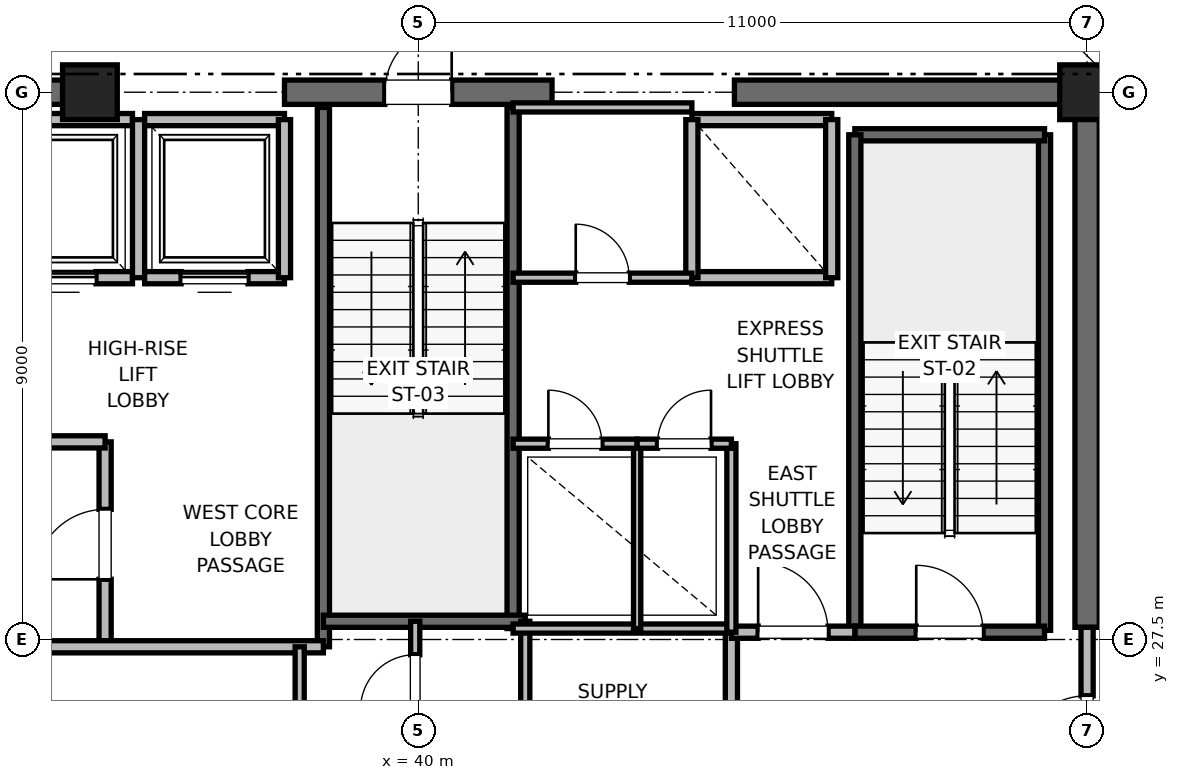
"""IFC4 building model, lengths in metres.
Left out: names, types, materials, properties, quantities, classifications, styles, units other than length and angle.
Written with IfcOpenShell. Run it as: python <this file> out.ifc"""

import sys

from ifc_helpers import new_model, si_unit, direction, frame, frame_2d, origin, origin_2d, place, context, subcontext, project, spatial, rectangle, extrude, element, fill, save


model = new_model("IFC4")
c1 = context("Model", 3, precision=1e-05, world=origin(), true_north=direction((0.0, 1.0)))
c2 = subcontext(c1, "Body", "Model", "MODEL_VIEW")
j1 = project(units=[si_unit("LENGTHUNIT", "METRE"), si_unit("PLANEANGLEUNIT", "RADIAN")], contexts=[c1])
p1 = place(None, origin())
s1 = spatial("IfcSite", under=j1, at=p1, CompositionType="ELEMENT")
p2 = place(p1, origin())
s2 = spatial("IfcBuilding", under=s1, at=p2, CompositionType="ELEMENT")
p3 = place(p2, frame((0.0, 0.0, 318.8)))
s3 = spatial("IfcBuildingStorey", under=s2, at=p3, CompositionType="ELEMENT", Elevation=318.8)
for number, where, z_axis, x_axis in (
    (1, (51.0, 36.5, 0.0), (0.0, 0.0, 1.0), (1.0, 0.0, 0.0)),
    (2, (34.6, 36.5, 0.0), (0.0, 0.0, 1.0), (1.0, 0.0, 0.0)),
):
    element("IfcColumn", number, at=place(p3, frame(where, z_axis=z_axis, x_axis=x_axis)), inside=s3, PredefinedType="PILASTER", context=c2, shape_type="SweptSolid", body=[
        extrude(rectangle(XDim=0.9, YDim=0.9, at=origin_2d()), origin(), (0.0, 0.0, 1.0), 4.0),
    ])
p4 = place(p3, frame((29.0, 36.5, 0.0), z_axis=(0.0, 0.0, 1.0), x_axis=(1.0, 0.0, 0.0)))
e3 = element("IfcWall", 3, at=p4, inside=s3, PredefinedType="SHEAR", context=c2, shape_type="SweptSolid", body=[
    extrude(rectangle(XDim=5.8, YDim=0.4, at=frame_2d((2.9, 0.0))), origin(), (0.0, 0.0, 1.0), 3.785),
])
p5 = place(p3, frame((37.8, 36.5, 0.0), z_axis=(0.0, 0.0, 1.0), x_axis=(1.0, 0.0, 0.0)))
e4 = element("IfcWall", 4, at=p5, inside=s3, PredefinedType="SHEAR", context=c2, shape_type="SweptSolid", body=[
    extrude(rectangle(XDim=4.4, YDim=0.4, at=frame_2d((2.2, 0.0))), origin(), (0.0, 0.0, 1.0), 3.785),
])
p6 = place(p5, frame((1.65, 0.0, 0.0)))
e5 = element("IfcOpeningElement", 5, at=p6, cuts=e4, PredefinedType="OPENING", context=c2, shape_type="SweptSolid", body=[
    extrude(rectangle(XDim=1.1, YDim=2.15, at=frame_2d((0.55, 1.075))), frame((0.0, 0.2, 0.0), z_axis=(0.0, -1.0, 0.0), x_axis=(1.0, 0.0, 0.0)), (0.0, 0.0, 1.0), 0.4),
])
p7 = place(p3, frame((45.2, 36.5, 0.0), z_axis=(0.0, 0.0, 1.0), x_axis=(1.0, 0.0, 0.0)))
e6 = element("IfcWall", 6, at=p7, inside=s3, PredefinedType="SHEAR", context=c2, shape_type="SweptSolid", body=[
    extrude(rectangle(XDim=5.8, YDim=0.4, at=frame_2d((2.9, 0.0))), origin(), (0.0, 0.0, 1.0), 3.785),
])
p8 = place(p3, frame((51.0, 27.7, 0.0), z_axis=(0.0, 0.0, 1.0), x_axis=(0.0, 1.0, 0.0)))
e7 = element("IfcWall", 7, at=p8, inside=s3, PredefinedType="SHEAR", context=c2, shape_type="SweptSolid", body=[
    extrude(rectangle(XDim=8.8, YDim=0.4, at=frame_2d((4.4, 0.0))), origin(), (0.0, 0.0, 1.0), 3.785),
])
p9 = place(p3, frame((50.3, 27.65, 0.0), z_axis=(0.0, 0.0, 1.0), x_axis=(0.0, 1.0, 0.0)))
e8 = element("IfcWall", 8, at=p9, inside=s3, PredefinedType="SOLIDWALL", context=c2, shape_type="SweptSolid", body=[
    extrude(rectangle(XDim=8.15, YDim=0.2, at=frame_2d((4.075, 0.0))), origin(), (0.0, 0.0, 1.0), 3.785),
])
p10 = place(p3, frame((47.18, 35.8, 0.0), z_axis=(0.0, 0.0, 1.0), x_axis=(1.0, 0.0, 0.0)))
e9 = element("IfcWall", 9, at=p10, inside=s3, PredefinedType="SOLIDWALL", context=c2, shape_type="SweptSolid", body=[
    extrude(rectangle(XDim=3.12, YDim=0.2, at=frame_2d((1.56, 0.0))), origin(), (0.0, 0.0, 1.0), 3.785),
])
p11 = place(p3, frame((47.18, 27.62, 0.0), z_axis=(0.0, 0.0, 1.0), x_axis=(0.0, 1.0, 0.0)))
e10 = element("IfcWall", 10, at=p11, inside=s3, PredefinedType="SOLIDWALL", context=c2, shape_type="SweptSolid", body=[
    extrude(rectangle(XDim=8.18, YDim=0.2, at=frame_2d((4.09, 0.0))), origin(), (0.0, 0.0, 1.0), 3.785),
])
p12 = place(p3, frame((47.18, 27.62, 0.0), z_axis=(0.0, 0.0, 1.0), x_axis=(1.0, 0.0, 0.0)))
e11 = element("IfcWall", 11, at=p12, inside=s3, PredefinedType="SOLIDWALL", context=c2, shape_type="SweptSolid", body=[
    extrude(rectangle(XDim=3.12, YDim=0.2, at=frame_2d((1.56, 0.0))), origin(), (0.0, 0.0, 1.0), 3.785),
])
p13 = place(p12, frame((1.01, 0.0, 0.0)))
e12 = element("IfcOpeningElement", 12, at=p13, cuts=e11, PredefinedType="OPENING", context=c2, shape_type="SweptSolid", body=[
    extrude(rectangle(XDim=1.1, YDim=2.15, at=frame_2d((0.55, 1.075))), frame((0.0, 0.1, 0.0), z_axis=(0.0, -1.0, 0.0), x_axis=(1.0, 0.0, 0.0)), (0.0, 0.0, 1.0), 0.2),
])
p14 = place(p3, frame((38.44, 27.38, 0.0), z_axis=(0.0, 0.0, 1.0), x_axis=(0.0, 1.0, 0.0)))
e13 = element("IfcWall", 13, at=p14, inside=s3, PredefinedType="SOLIDWALL", context=c2, shape_type="SweptSolid", body=[
    extrude(rectangle(XDim=8.87, YDim=0.2, at=frame_2d((4.435, 0.0))), origin(), (0.0, 0.0, 1.0), 3.785),
])
p15 = place(p3, frame((41.56, 27.68, 0.0), z_axis=(0.0, 0.0, 1.0), x_axis=(0.0, 1.0, 0.0)))
e14 = element("IfcWall", 14, at=p15, inside=s3, PredefinedType="SOLIDWALL", context=c2, shape_type="SweptSolid", body=[
    extrude(rectangle(XDim=8.57, YDim=0.2, at=frame_2d((4.285, 0.0))), origin(), (0.0, 0.0, 1.0), 3.785),
])
p16 = place(p3, frame((38.44, 27.8, 0.0), z_axis=(0.0, 0.0, 1.0), x_axis=(1.0, 0.0, 0.0)))
e15 = element("IfcWall", 15, at=p16, inside=s3, PredefinedType="SOLIDWALL", context=c2, shape_type="SweptSolid", body=[
    extrude(rectangle(XDim=3.32, YDim=0.2, at=frame_2d((1.66, 0.0))), origin(), (0.0, 0.0, 1.0), 3.785),
])
p17 = place(p3, frame((34.85, 27.38, 0.0), z_axis=(0.0, 0.0, 1.0), x_axis=(0.0, 1.0, 0.0)))
e16 = element("IfcWall", 16, at=p17, inside=s3, PredefinedType="PARTITIONING", context=c2, shape_type="SweptSolid", body=[
    extrude(rectangle(XDim=3.37, YDim=0.2, at=frame_2d((1.685, 0.0))), origin(), (0.0, 0.0, 1.0), 3.785),
])
p18 = place(p17, frame((1.11, 0.0, 0.0)))
e17 = element("IfcOpeningElement", 17, at=p18, cuts=e16, PredefinedType="OPENING", context=c2, shape_type="SweptSolid", body=[
    extrude(rectangle(XDim=1.15, YDim=2.2, at=frame_2d((0.575, 1.1))), frame((0.0, 0.1, 0.0), z_axis=(0.0, -1.0, 0.0), x_axis=(1.0, 0.0, 0.0)), (0.0, 0.0, 1.0), 0.2),
])
p19 = place(p3, frame((32.82, 27.38, 0.0), z_axis=(0.0, 0.0, 1.0), x_axis=(1.0, 0.0, 0.0)))
e18 = element("IfcWall", 18, at=p19, inside=s3, PredefinedType="PARTITIONING", context=c2, shape_type="SweptSolid", body=[
    extrude(rectangle(XDim=5.62, YDim=0.2, at=frame_2d((2.81, 0.0))), origin(), (0.0, 0.0, 1.0), 3.785),
])
p20 = place(p3, frame((32.15, 30.75, 0.0), z_axis=(0.0, 0.0, 1.0), x_axis=(1.0, 0.0, 0.0)))
e19 = element("IfcWall", 19, at=p20, inside=s3, PredefinedType="PARTITIONING", context=c2, shape_type="SweptSolid", body=[
    extrude(rectangle(XDim=2.7, YDim=0.2, at=frame_2d((1.35, 0.0))), origin(), (0.0, 0.0, 1.0), 3.785),
])
p21 = place(p3, frame((45.15, 24.25, 0.0), z_axis=(0.0, 0.0, 1.0), x_axis=(0.0, 1.0, 0.0)))
e20 = element("IfcWall", 20, at=p21, inside=s3, PredefinedType="PARTITIONING", context=c2, shape_type="SweptSolid", body=[
    extrude(rectangle(XDim=3.37, YDim=0.2, at=frame_2d((1.685, 0.0))), origin(), (0.0, 0.0, 1.0), 3.785),
])
p22 = place(p3, frame((45.15, 27.62, 0.0), z_axis=(0.0, 0.0, 1.0), x_axis=(1.0, 0.0, 0.0)))
e21 = element("IfcWall", 21, at=p22, inside=s3, PredefinedType="PARTITIONING", context=c2, shape_type="SweptSolid", body=[
    extrude(rectangle(XDim=2.03, YDim=0.2, at=frame_2d((1.015, 0.0))), origin(), (0.0, 0.0, 1.0), 3.785),
])
p23 = place(p22, frame((0.44, 0.0, 0.0)))
e22 = element("IfcOpeningElement", 22, at=p23, cuts=e21, PredefinedType="OPENING", context=c2, shape_type="SweptSolid", body=[
    extrude(rectangle(XDim=1.15, YDim=2.2, at=frame_2d((0.575, 1.1))), frame((0.0, 0.1, 0.0), z_axis=(0.0, -1.0, 0.0), x_axis=(1.0, 0.0, 0.0)), (0.0, 0.0, 1.0), 0.2),
])
p24 = place(p3, frame((51.0, 24.3, 0.0), z_axis=(0.0, 0.0, 1.0), x_axis=(0.0, 1.0, 0.0)))
e23 = element("IfcWall", 23, at=p24, inside=s3, PredefinedType="PARTITIONING", context=c2, shape_type="SweptSolid", body=[
    extrude(rectangle(XDim=3.4, YDim=0.2, at=frame_2d((1.7, 0.0))), origin(), (0.0, 0.0, 1.0), 2.865),
])
p25 = place(p24, frame((1.125, 0.0, 0.0)))
e24 = element("IfcOpeningElement", 24, at=p25, cuts=e23, PredefinedType="OPENING", context=c2, shape_type="SweptSolid", body=[
    extrude(rectangle(XDim=1.15, YDim=2.2, at=frame_2d((0.575, 1.1))), frame((0.0, 0.1, 0.0), z_axis=(0.0, -1.0, 0.0), x_axis=(1.0, 0.0, 0.0)), (0.0, 0.0, 1.0), 0.2),
])
p26 = place(p3, frame((33.0, 33.45, 0.0), z_axis=(0.0, 0.0, 1.0), x_axis=(1.0, 0.0, 0.0)))
e25 = element("IfcWall", 25, at=p26, inside=s3, PredefinedType="SOLIDWALL", context=c2, shape_type="SweptSolid", body=[
    extrude(rectangle(XDim=2.3, YDim=0.2, at=frame_2d((1.15, 0.0))), origin(), (0.0, 0.0, 1.0), 3.785),
])
p27 = place(p26, frame((0.6, 0.0, 0.0)))
e26 = element("IfcOpeningElement", 26, at=p27, cuts=e25, PredefinedType="OPENING", context=c2, shape_type="SweptSolid", body=[
    extrude(rectangle(XDim=1.1, YDim=2.2, at=frame_2d((0.55, 1.1))), frame((0.0, 0.1, 0.0), z_axis=(0.0, -1.0, 0.0), x_axis=(1.0, 0.0, 0.0)), (0.0, 0.0, 1.0), 0.2),
])
p28 = place(p3, frame((35.3, 36.05, 0.0), z_axis=(0.0, 0.0, 1.0), x_axis=(-1.0, 0.0, 0.0)))
e27 = element("IfcWall", 27, at=p28, inside=s3, PredefinedType="SOLIDWALL", context=c2, shape_type="SweptSolid", body=[
    extrude(rectangle(XDim=2.3, YDim=0.2, at=frame_2d((1.15, 0.0))), origin(), (0.0, 0.0, 1.0), 2.865),
])
p29 = place(p3, frame((35.4, 33.45, 0.0), z_axis=(0.0, 0.0, 1.0), x_axis=(0.0, 1.0, 0.0)))
e28 = element("IfcWall", 28, at=p29, inside=s3, PredefinedType="SOLIDWALL", context=c2, shape_type="SweptSolid", body=[
    extrude(rectangle(XDim=2.6, YDim=0.2, at=frame_2d((1.3, 0.0))), origin(), (0.0, 0.0, 1.0), 2.865),
])
p30 = place(p3, frame((35.5, 33.45, 0.0), z_axis=(0.0, 0.0, 1.0), x_axis=(1.0, 0.0, 0.0)))
e29 = element("IfcWall", 29, at=p30, inside=s3, PredefinedType="SOLIDWALL", context=c2, shape_type="SweptSolid", body=[
    extrude(rectangle(XDim=2.3, YDim=0.2, at=frame_2d((1.15, 0.0))), origin(), (0.0, 0.0, 1.0), 3.785),
])
p31 = place(p30, frame((0.6, 0.0, 0.0)))
e30 = element("IfcOpeningElement", 30, at=p31, cuts=e29, PredefinedType="OPENING", context=c2, shape_type="SweptSolid", body=[
    extrude(rectangle(XDim=1.1, YDim=2.2, at=frame_2d((0.55, 1.1))), frame((0.0, 0.1, 0.0), z_axis=(0.0, -1.0, 0.0), x_axis=(1.0, 0.0, 0.0)), (0.0, 0.0, 1.0), 0.2),
])
p32 = place(p3, frame((37.8, 36.05, 0.0), z_axis=(0.0, 0.0, 1.0), x_axis=(-1.0, 0.0, 0.0)))
e31 = element("IfcWall", 31, at=p32, inside=s3, PredefinedType="SOLIDWALL", context=c2, shape_type="SweptSolid", body=[
    extrude(rectangle(XDim=2.3, YDim=0.2, at=frame_2d((1.15, 0.0))), origin(), (0.0, 0.0, 1.0), 2.865),
])
p33 = place(p3, frame((37.8, 33.45, 0.0), z_axis=(0.0, 0.0, 1.0), x_axis=(0.0, 1.0, 0.0)))
e32 = element("IfcWall", 32, at=p33, inside=s3, PredefinedType="SOLIDWALL", context=c2, shape_type="SweptSolid", body=[
    extrude(rectangle(XDim=2.6, YDim=0.2, at=frame_2d((1.3, 0.0))), origin(), (0.0, 0.0, 1.0), 2.865),
])
p34 = place(p3, frame((44.5, 33.45, 0.0), z_axis=(0.0, 0.0, 1.0), x_axis=(1.0, 0.0, 0.0)))
e33 = element("IfcWall", 33, at=p34, inside=s3, PredefinedType="SOLIDWALL", context=c2, shape_type="SweptSolid", body=[
    extrude(rectangle(XDim=2.3, YDim=0.2, at=frame_2d((1.15, 0.0))), origin(), (0.0, 0.0, 1.0), 3.785),
])
p35 = place(p3, frame((46.8, 36.05, 0.0), z_axis=(0.0, 0.0, 1.0), x_axis=(-1.0, 0.0, 0.0)))
e34 = element("IfcWall", 34, at=p35, inside=s3, PredefinedType="SOLIDWALL", context=c2, shape_type="SweptSolid", body=[
    extrude(rectangle(XDim=2.3, YDim=0.2, at=frame_2d((1.15, 0.0))), origin(), (0.0, 0.0, 1.0), 2.865),
])
p36 = place(p3, frame((44.5, 36.05, 0.0), z_axis=(0.0, 0.0, 1.0), x_axis=(0.0, -1.0, 0.0)))
e35 = element("IfcWall", 35, at=p36, inside=s3, PredefinedType="SOLIDWALL", context=c2, shape_type="SweptSolid", body=[
    extrude(rectangle(XDim=2.6, YDim=0.2, at=frame_2d((1.3, 0.0))), origin(), (0.0, 0.0, 1.0), 2.865),
])
p37 = place(p3, frame((46.8, 33.45, 0.0), z_axis=(0.0, 0.0, 1.0), x_axis=(0.0, 1.0, 0.0)))
e36 = element("IfcWall", 36, at=p37, inside=s3, PredefinedType="SOLIDWALL", context=c2, shape_type="SweptSolid", body=[
    extrude(rectangle(XDim=2.6, YDim=0.2, at=frame_2d((1.3, 0.0))), origin(), (0.0, 0.0, 1.0), 3.785),
])
p38 = place(p3, frame((41.76, 23.8, 0.0), z_axis=(0.0, 0.0, 1.0), x_axis=(0.0, 1.0, 0.0)))
e37 = element("IfcWall", 37, at=p38, inside=s3, PredefinedType="PARTITIONING", context=c2, shape_type="SweptSolid", body=[
    extrude(rectangle(XDim=4.0, YDim=0.15, at=frame_2d((2.0, 0.0))), origin(), (0.0, 0.0, 1.0), 2.85),
])
p39 = place(p3, frame((39.95, 25.8, 0.0), z_axis=(0.0, 0.0, 1.0), x_axis=(0.0, 1.0, 0.0)))
e38 = element("IfcWall", 38, at=p39, inside=s3, PredefinedType="PARTITIONING", context=c2, shape_type="SweptSolid", body=[
    extrude(rectangle(XDim=2.0, YDim=0.15, at=frame_2d((1.0, 0.0))), origin(), (0.0, 0.0, 1.0), 2.85),
])
p40 = place(p39, frame((0.55, 0.0, 0.0)))
e39 = element("IfcOpeningElement", 39, at=p40, cuts=e38, PredefinedType="OPENING", context=c2, shape_type="SweptSolid", body=[
    extrude(rectangle(XDim=0.9, YDim=2.1, at=frame_2d((0.45, 1.05))), frame((0.0, 0.075, 0.0), z_axis=(0.0, -1.0, 0.0), x_axis=(1.0, 0.0, 0.0)), (0.0, 0.0, 1.0), 0.15),
])
p41 = place(p3, frame((38.05, 24.5, 0.0), z_axis=(0.0, 0.0, 1.0), x_axis=(0.0, 1.0, 0.0)))
e40 = element("IfcWall", 40, at=p41, inside=s3, PredefinedType="PARTITIONING", context=c2, shape_type="SweptSolid", body=[
    extrude(rectangle(XDim=2.88, YDim=0.15, at=frame_2d((1.44, 0.0))), origin(), (0.0, 0.0, 1.0), 2.85),
])
p42 = place(p41, frame((0.94, 0.0, 0.0)))
e41 = element("IfcOpeningElement", 41, at=p42, cuts=e40, PredefinedType="OPENING", context=c2, shape_type="SweptSolid", body=[
    extrude(rectangle(XDim=1.0, YDim=2.15, at=frame_2d((0.5, 1.075))), frame((0.0, 0.075, 0.0), z_axis=(0.0, -1.0, 0.0), x_axis=(1.0, 0.0, 0.0)), (0.0, 0.0, 1.0), 0.15),
])
p43 = place(p3, frame((41.56, 27.68, 0.0), z_axis=(0.0, 0.0, 1.0), x_axis=(1.0, 0.0, 0.0)))
e42 = element("IfcWall", 42, at=p43, inside=s3, PredefinedType="PARTITIONING", context=c2, shape_type="SweptSolid", body=[
    extrude(rectangle(XDim=3.59, YDim=0.15, at=frame_2d((1.795, 0.0))), origin(), (0.0, 0.0, 1.0), 2.85),
])
p44 = place(p3, frame((45.15, 27.62, 0.0), z_axis=(0.0, 0.0, 1.0), x_axis=(0.0, 1.0, 0.0)))
e43 = element("IfcWall", 43, at=p44, inside=s3, PredefinedType="PARTITIONING", context=c2, shape_type="SweptSolid", body=[
    extrude(rectangle(XDim=3.1, YDim=0.15, at=frame_2d((1.55, 0.0))), origin(), (0.0, 0.0, 1.0), 2.85),
])
p45 = place(p3, frame((43.6, 27.68, 0.0), z_axis=(0.0, 0.0, 1.0), x_axis=(0.0, 1.0, 0.0)))
e44 = element("IfcWall", 44, at=p45, inside=s3, PredefinedType="PARTITIONING", context=c2, shape_type="SweptSolid", body=[
    extrude(rectangle(XDim=3.04, YDim=0.12, at=frame_2d((1.52, 0.0))), origin(), (0.0, 0.0, 1.0), 2.85),
])
p46 = place(p3, frame((41.56, 30.72, 0.0), z_axis=(0.0, 0.0, 1.0), x_axis=(1.0, 0.0, 0.0)))
e45 = element("IfcWall", 45, at=p46, inside=s3, PredefinedType="PARTITIONING", context=c2, shape_type="SweptSolid", body=[
    extrude(rectangle(XDim=2.04, YDim=0.15, at=frame_2d((1.02, 0.0))), origin(), (0.0, 0.0, 1.0), 2.85),
])
p47 = place(p46, frame((0.58, 0.0, 0.0)))
e46 = element("IfcOpeningElement", 46, at=p47, cuts=e45, PredefinedType="OPENING", context=c2, shape_type="SweptSolid", body=[
    extrude(rectangle(XDim=0.88, YDim=2.1, at=frame_2d((0.44, 1.05))), frame((0.0, 0.075, 0.0), z_axis=(0.0, -1.0, 0.0), x_axis=(1.0, 0.0, 0.0)), (0.0, 0.0, 1.0), 0.15),
])
p48 = place(p3, frame((43.6, 30.72, 0.0), z_axis=(0.0, 0.0, 1.0), x_axis=(1.0, 0.0, 0.0)))
e47 = element("IfcWall", 47, at=p48, inside=s3, PredefinedType="PARTITIONING", context=c2, shape_type="SweptSolid", body=[
    extrude(rectangle(XDim=1.55, YDim=0.15, at=frame_2d((0.775, 0.0))), origin(), (0.0, 0.0, 1.0), 2.85),
])
p49 = place(p48, frame((0.335, 0.0, 0.0)))
e48 = element("IfcOpeningElement", 48, at=p49, cuts=e47, PredefinedType="OPENING", context=c2, shape_type="SweptSolid", body=[
    extrude(rectangle(XDim=0.88, YDim=2.1, at=frame_2d((0.44, 1.05))), frame((0.0, 0.075, 0.0), z_axis=(0.0, -1.0, 0.0), x_axis=(1.0, 0.0, 0.0)), (0.0, 0.0, 1.0), 0.15),
])
p50 = place(p3, frame((41.56, 36.25, 0.0), z_axis=(0.0, 0.0, 1.0), x_axis=(1.0, 0.0, 0.0)))
e49 = element("IfcWall", 49, at=p50, inside=s3, PredefinedType="PARTITIONING", context=c2, shape_type="SweptSolid", body=[
    extrude(rectangle(XDim=2.94, YDim=0.15, at=frame_2d((1.47, 0.0))), origin(), (0.0, 0.0, 1.0), 2.85),
])
p51 = place(p3, frame((41.56, 33.45, 0.0), z_axis=(0.0, 0.0, 1.0), x_axis=(1.0, 0.0, 0.0)))
e50 = element("IfcWall", 50, at=p51, inside=s3, PredefinedType="PARTITIONING", context=c2, shape_type="SweptSolid", body=[
    extrude(rectangle(XDim=2.94, YDim=0.15, at=frame_2d((1.47, 0.0))), origin(), (0.0, 0.0, 1.0), 2.85),
])
p52 = place(p51, frame((1.03, 0.0, 0.0)))
e51 = element("IfcOpeningElement", 51, at=p52, cuts=e50, PredefinedType="OPENING", context=c2, shape_type="SweptSolid", body=[
    extrude(rectangle(XDim=0.88, YDim=2.1, at=frame_2d((0.44, 1.05))), frame((0.0, 0.075, 0.0), z_axis=(0.0, -1.0, 0.0), x_axis=(1.0, 0.0, 0.0)), (0.0, 0.0, 1.0), 0.15),
])
p53 = place(p13, origin())
e52 = element("IfcDoor", 52, at=p53, inside=s3, OperationType="SINGLE_SWING_LEFT", PredefinedType="DOOR", context=c2, shape_type="SweptSolid", body=[
    extrude(rectangle(XDim=1.1, YDim=2.15, at=frame_2d((0.55, 1.075))), frame((0.0, 0.025, 0.0), z_axis=(0.0, -1.0, 0.0), x_axis=(1.0, 0.0, 0.0)), (0.0, 0.0, 1.0), 0.05),
])
fill(e12, e52)
p54 = place(p6, origin())
e53 = element("IfcDoor", 53, at=p54, inside=s3, OperationType="SINGLE_SWING_RIGHT", PredefinedType="DOOR", context=c2, shape_type="SweptSolid", body=[
    extrude(rectangle(XDim=1.1, YDim=2.15, at=frame_2d((0.55, 1.075))), frame((0.0, 0.025, 0.0), z_axis=(0.0, -1.0, 0.0), x_axis=(1.0, 0.0, 0.0)), (0.0, 0.0, 1.0), 0.05),
])
fill(e5, e53)
p55 = place(p18, origin())
e54 = element("IfcDoor", 54, at=p55, inside=s3, OperationType="SINGLE_SWING_LEFT", PredefinedType="DOOR", context=c2, shape_type="SweptSolid", body=[
    extrude(rectangle(XDim=1.15, YDim=2.2, at=frame_2d((0.575, 1.1))), frame((0.0, 0.025, 0.0), z_axis=(0.0, -1.0, 0.0), x_axis=(1.0, 0.0, 0.0)), (0.0, 0.0, 1.0), 0.05),
])
fill(e17, e54)
p56 = place(p23, origin())
e55 = element("IfcDoor", 55, at=p56, inside=s3, OperationType="SINGLE_SWING_LEFT", PredefinedType="DOOR", context=c2, shape_type="SweptSolid", body=[
    extrude(rectangle(XDim=1.15, YDim=2.2, at=frame_2d((0.575, 1.1))), frame((0.0, 0.025, 0.0), z_axis=(0.0, -1.0, 0.0), x_axis=(1.0, 0.0, 0.0)), (0.0, 0.0, 1.0), 0.05),
])
fill(e22, e55)
p57 = place(p25, origin())
e56 = element("IfcDoor", 56, at=p57, inside=s3, OperationType="SINGLE_SWING_LEFT", PredefinedType="DOOR", context=c2, shape_type="SweptSolid", body=[
    extrude(rectangle(XDim=1.15, YDim=2.2, at=frame_2d((0.575, 1.1))), frame((0.0, 0.025, 0.0), z_axis=(0.0, -1.0, 0.0), x_axis=(1.0, 0.0, 0.0)), (0.0, 0.0, 1.0), 0.05),
])
fill(e24, e56)
p58 = place(p27, origin())
e57 = element("IfcDoor", 57, at=p58, inside=s3, OperationType="SLIDING_TO_RIGHT", PredefinedType="DOOR", context=c2, shape_type="SweptSolid", body=[
    extrude(rectangle(XDim=1.1, YDim=2.2, at=frame_2d((0.55, 1.1))), frame((0.0, 0.025, 0.0), z_axis=(0.0, -1.0, 0.0), x_axis=(1.0, 0.0, 0.0)), (0.0, 0.0, 1.0), 0.05),
])
fill(e26, e57)
p59 = place(p31, origin())
e58 = element("IfcDoor", 58, at=p59, inside=s3, OperationType="SLIDING_TO_RIGHT", PredefinedType="DOOR", context=c2, shape_type="SweptSolid", body=[
    extrude(rectangle(XDim=1.1, YDim=2.2, at=frame_2d((0.55, 1.1))), frame((0.0, 0.025, 0.0), z_axis=(0.0, -1.0, 0.0), x_axis=(1.0, 0.0, 0.0)), (0.0, 0.0, 1.0), 0.05),
])
fill(e30, e58)
p60 = place(p40, origin())
e59 = element("IfcDoor", 59, at=p60, inside=s3, OperationType="SINGLE_SWING_LEFT", PredefinedType="DOOR", context=c2, shape_type="SweptSolid", body=[
    extrude(rectangle(XDim=0.9, YDim=2.1, at=frame_2d((0.45, 1.05))), frame((0.0, 0.025, 0.0), z_axis=(0.0, -1.0, 0.0), x_axis=(1.0, 0.0, 0.0)), (0.0, 0.0, 1.0), 0.05),
])
fill(e39, e59)
p61 = place(p47, origin())
e60 = element("IfcDoor", 60, at=p61, inside=s3, OperationType="SINGLE_SWING_LEFT", PredefinedType="DOOR", context=c2, shape_type="SweptSolid", body=[
    extrude(rectangle(XDim=0.88, YDim=2.1, at=frame_2d((0.44, 1.05))), frame((0.0, 0.025, 0.0), z_axis=(0.0, -1.0, 0.0), x_axis=(1.0, 0.0, 0.0)), (0.0, 0.0, 1.0), 0.05),
])
fill(e46, e60)
p62 = place(p49, origin())
e61 = element("IfcDoor", 61, at=p62, inside=s3, OperationType="SINGLE_SWING_RIGHT", PredefinedType="DOOR", context=c2, shape_type="SweptSolid", body=[
    extrude(rectangle(XDim=0.88, YDim=2.1, at=frame_2d((0.44, 1.05))), frame((0.0, 0.025, 0.0), z_axis=(0.0, -1.0, 0.0), x_axis=(1.0, 0.0, 0.0)), (0.0, 0.0, 1.0), 0.05),
])
fill(e48, e61)
p63 = place(p52, origin())
e62 = element("IfcDoor", 62, at=p63, inside=s3, OperationType="SINGLE_SWING_LEFT", PredefinedType="DOOR", context=c2, shape_type="SweptSolid", body=[
    extrude(rectangle(XDim=0.88, YDim=2.1, at=frame_2d((0.44, 1.05))), frame((0.0, 0.025, 0.0), z_axis=(0.0, -1.0, 0.0), x_axis=(1.0, 0.0, 0.0)), (0.0, 0.0, 1.0), 0.05),
])
fill(e51, e62)
save(model, sys.argv[1])
